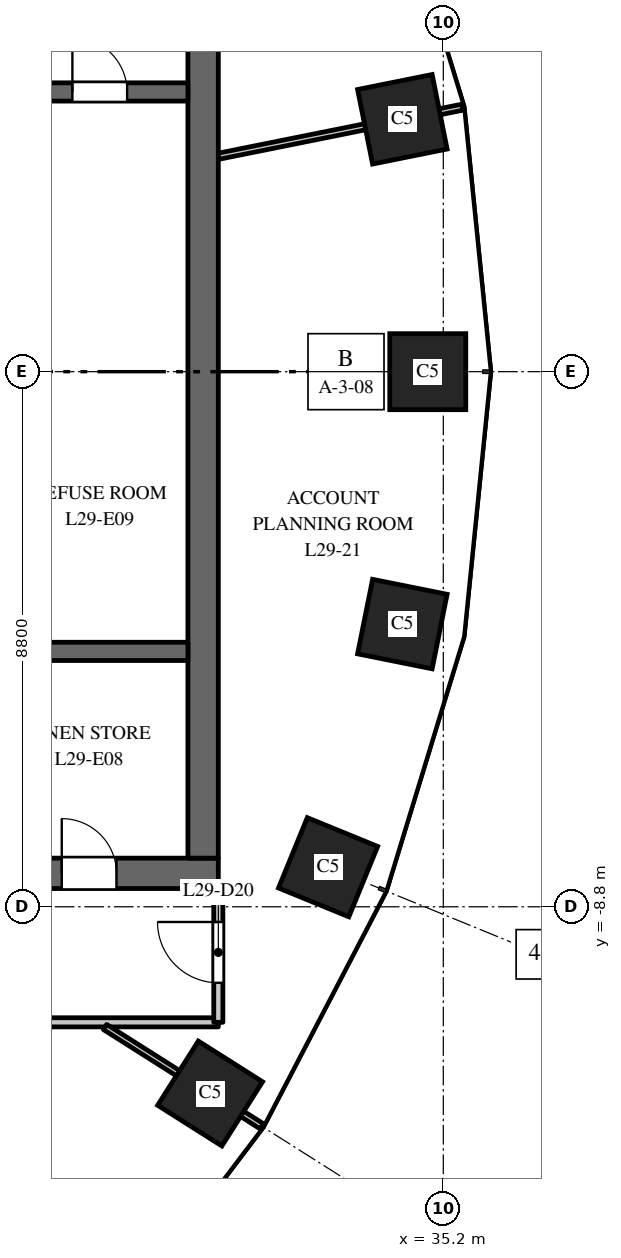
"""IFC4 building model, lengths in metres.
Left out: names, types, materials, properties, quantities, classifications, styles, units other than length and angle.
Written with IfcOpenShell. Run it as: python <this file> out.ifc"""

import sys

from ifc_helpers import new_model, si_unit, direction, frame, frame_2d, origin, origin_2d, place, context, subcontext, project, spatial, rectangle, extrude, element, fill, save


model = new_model("IFC4")
c1 = context("Model", 3, precision=1e-05, world=origin(), true_north=direction((0.0, 1.0)))
c2 = subcontext(c1, "Body", "Model", "MODEL_VIEW")
j1 = project(units=[si_unit("LENGTHUNIT", "METRE"), si_unit("PLANEANGLEUNIT", "RADIAN")], contexts=[c1])
p1 = place(None, origin())
s1 = spatial("IfcSite", under=j1, at=p1, CompositionType="ELEMENT")
p2 = place(p1, origin())
s2 = spatial("IfcBuilding", under=s1, at=p2, CompositionType="ELEMENT")
p3 = place(p2, frame((0.0, 0.0, 128.0)))
s3 = spatial("IfcBuildingStorey", under=s2, at=p3, CompositionType="ELEMENT", Elevation=128.0)
for number, where, z_axis, x_axis in (
    (1, (34.945, 0.0, 0.0), (0.0, 0.0, 1.0), (0.0, 1.0, 0.0)),
    (2, (34.527, 4.151, 0.0), (0.0, 0.0, 1.0), (-0.197, 0.98, 0.0)),
    (3, (31.365, -11.871, 0.0), (0.0, 0.0, 1.0), (0.535, 0.845, 0.0)),
    (4, (33.305, -8.149, 0.0), (0.0, 0.0, 1.0), (0.379, 0.925, 0.0)),
    (5, (34.527, -4.151, 0.0), (0.0, 0.0, 1.0), (0.197, 0.98, 0.0)),
):
    element("IfcColumn", number, at=place(p3, frame(where, z_axis=z_axis, x_axis=x_axis)), inside=s3, PredefinedType="COLUMN", context=c2, shape_type="SweptSolid", body=[
        extrude(rectangle(XDim=1.25, YDim=1.25, at=origin_2d()), origin(), (0.0, 0.0, 1.0), 4.0),
    ])
p4 = place(p3, frame((16.5, -8.25, 0.0), z_axis=(0.0, 0.0, 1.0), x_axis=(1.0, 0.0, 0.0)))
e6 = element("IfcWall", 6, at=p4, inside=s3, PredefinedType="SHEAR", context=c2, shape_type="SweptSolid", body=[
    extrude(rectangle(XDim=15.0, YDim=0.5, at=frame_2d((7.5, 0.0))), origin(), (0.0, 0.0, 1.0), 3.7),
])
p5 = place(p4, frame((6.9, 0.0, 0.0)))
e7 = element("IfcOpeningElement", 7, at=p5, cuts=e6, PredefinedType="OPENING", context=c2, shape_type="SweptSolid", body=[
    extrude(rectangle(XDim=1.2, YDim=2.1, at=frame_2d((0.6, 1.05))), frame((0.0, 0.26, 0.0), z_axis=(0.0, -1.0, 0.0), x_axis=(1.0, 0.0, 0.0)), (0.0, 0.0, 1.0), 0.52),
])
p6 = place(p4, frame((12.425, 0.0, 0.0)))
e8 = element("IfcOpeningElement", 8, at=p6, cuts=e6, PredefinedType="OPENING", context=c2, shape_type="SweptSolid", body=[
    extrude(rectangle(XDim=0.9, YDim=2.1, at=frame_2d((0.45, 1.05))), frame((0.0, 0.26, 0.0), z_axis=(0.0, -1.0, 0.0), x_axis=(1.0, 0.0, 0.0)), (0.0, 0.0, 1.0), 0.52),
])
p7 = place(p3, frame((31.25, -8.0, 0.0), z_axis=(0.0, 0.0, 1.0), x_axis=(0.0, 1.0, 0.0)))
e9 = element("IfcWall", 9, at=p7, inside=s3, PredefinedType="SHEAR", context=c2, shape_type="SweptSolid", body=[
    extrude(rectangle(XDim=16.0, YDim=0.5, at=frame_2d((8.0, 0.0))), origin(), (0.0, 0.0, 1.0), 3.7),
])
p8 = place(p3, frame((24.9, 4.6, 0.0), z_axis=(0.0, 0.0, 1.0), x_axis=(1.0, 0.0, 0.0)))
e10 = element("IfcWall", 10, at=p8, inside=s3, PredefinedType="SHEAR", context=c2, shape_type="SweptSolid", body=[
    extrude(rectangle(XDim=6.1, YDim=0.3, at=frame_2d((3.05, 0.0))), origin(), (0.0, 0.0, 1.0), 3.7),
])
p9 = place(p8, frame((4.2, 0.0, 0.0)))
e11 = element("IfcOpeningElement", 11, at=p9, cuts=e10, PredefinedType="OPENING", context=c2, shape_type="SweptSolid", body=[
    extrude(rectangle(XDim=0.9, YDim=2.1, at=frame_2d((0.45, 1.05))), frame((0.0, 0.16, 0.0), z_axis=(0.0, -1.0, 0.0), x_axis=(1.0, 0.0, 0.0)), (0.0, 0.0, 1.0), 0.32),
])
p10 = place(p3, frame((24.9, -4.6, 0.0), z_axis=(0.0, 0.0, 1.0), x_axis=(1.0, 0.0, 0.0)))
e12 = element("IfcWall", 12, at=p10, inside=s3, PredefinedType="SHEAR", context=c2, shape_type="SweptSolid", body=[
    extrude(rectangle(XDim=6.1, YDim=0.3, at=frame_2d((3.05, 0.0))), origin(), (0.0, 0.0, 1.0), 3.7),
])
p11 = place(p3, frame((16.5, -10.7, 0.0), z_axis=(0.0, 0.0, 1.0), x_axis=(1.0, 0.0, 0.0)))
e13 = element("IfcWall", 13, at=p11, inside=s3, PredefinedType="PARTITIONING", context=c2, shape_type="SweptSolid", body=[
    extrude(rectangle(XDim=15.0, YDim=0.15, at=frame_2d((7.5, 0.0))), origin(), (0.0, 0.0, 1.0), 2.75),
])
p12 = place(p11, frame((8.65, 0.0, 0.0)))
e14 = element("IfcOpeningElement", 14, at=p12, cuts=e13, PredefinedType="OPENING", context=c2, shape_type="SweptSolid", body=[
    extrude(rectangle(XDim=1.0, YDim=2.1, at=frame_2d((0.5, 1.05))), frame((0.0, 0.085, 0.0), z_axis=(0.0, -1.0, 0.0), x_axis=(1.0, 0.0, 0.0)), (0.0, 0.0, 1.0), 0.17),
])
p13 = place(p3, frame((29.637, -10.777, 0.0), z_axis=(0.0, 0.0, 1.0), x_axis=(0.844810627195, -0.535065420467, 0.0)))
e15 = element("IfcWall", 15, at=p13, inside=s3, PredefinedType="PARTITIONING", context=c2, shape_type="SweptSolid", body=[
    extrude(rectangle(XDim=3.048, YDim=0.1, at=frame_2d((1.524, 0.0))), origin(), (0.0, 0.0, 1.0), 2.9),
])
p14 = place(p3, frame((31.5, -10.7, 0.0), z_axis=(0.0, 0.0, 1.0), x_axis=(0.0, 1.0, 0.0)))
e16 = element("IfcWall", 16, at=p14, inside=s3, PredefinedType="PARTITIONING", context=c2, shape_type="SweptSolid", body=[
    extrude(rectangle(XDim=2.2, YDim=0.15, at=frame_2d((1.1, 0.0))), origin(), (0.0, 0.0, 1.0), 2.9),
])
p15 = place(p14, frame((0.65, 0.0, 0.0)))
e17 = element("IfcOpeningElement", 17, at=p15, cuts=e16, PredefinedType="OPENING", context=c2, shape_type="SweptSolid", body=[
    extrude(rectangle(XDim=1.0, YDim=2.1, at=frame_2d((0.5, 1.05))), frame((0.0, 0.085, 0.0), z_axis=(0.0, -1.0, 0.0), x_axis=(1.0, 0.0, 0.0)), (0.0, 0.0, 1.0), 0.17),
])
p16 = place(p3, frame((31.5, 3.542, 0.0), z_axis=(0.0, 0.0, 1.0), x_axis=(0.980357474535, 0.197228857227, 0.0)))
e18 = element("IfcWall", 18, at=p16, inside=s3, PredefinedType="PARTITIONING", context=c2, shape_type="SweptSolid", body=[
    extrude(rectangle(XDim=4.092, YDim=0.1, at=frame_2d((2.046, 0.0))), origin(), (0.0, 0.0, 1.0), 2.9),
])
p17 = place(p6, origin())
e19 = element("IfcDoor", 19, at=p17, inside=s3, OperationType="SINGLE_SWING_RIGHT", PredefinedType="DOOR", context=c2, shape_type="SweptSolid", body=[
    extrude(rectangle(XDim=0.9, YDim=2.1, at=frame_2d((0.45, 1.05))), frame((0.0, 0.025, 0.0), z_axis=(0.0, -1.0, 0.0), x_axis=(1.0, 0.0, 0.0)), (0.0, 0.0, 1.0), 0.05),
])
fill(e8, e19)
p18 = place(p9, origin())
e20 = element("IfcDoor", 20, at=p18, inside=s3, OperationType="SINGLE_SWING_RIGHT", PredefinedType="DOOR", context=c2, shape_type="SweptSolid", body=[
    extrude(rectangle(XDim=0.9, YDim=2.1, at=frame_2d((0.45, 1.05))), frame((0.0, 0.025, 0.0), z_axis=(0.0, -1.0, 0.0), x_axis=(1.0, 0.0, 0.0)), (0.0, 0.0, 1.0), 0.05),
])
fill(e11, e20)
p19 = place(p15, origin())
e21 = element("IfcDoor", 21, at=p19, inside=s3, OperationType="SINGLE_SWING_RIGHT", PredefinedType="DOOR", context=c2, shape_type="SweptSolid", body=[
    extrude(rectangle(XDim=1.0, YDim=2.1, at=frame_2d((0.5, 1.05))), frame((0.0, 0.025, 0.0), z_axis=(0.0, -1.0, 0.0), x_axis=(1.0, 0.0, 0.0)), (0.0, 0.0, 1.0), 0.05),
])
fill(e17, e21)
save(model, sys.argv[1])
